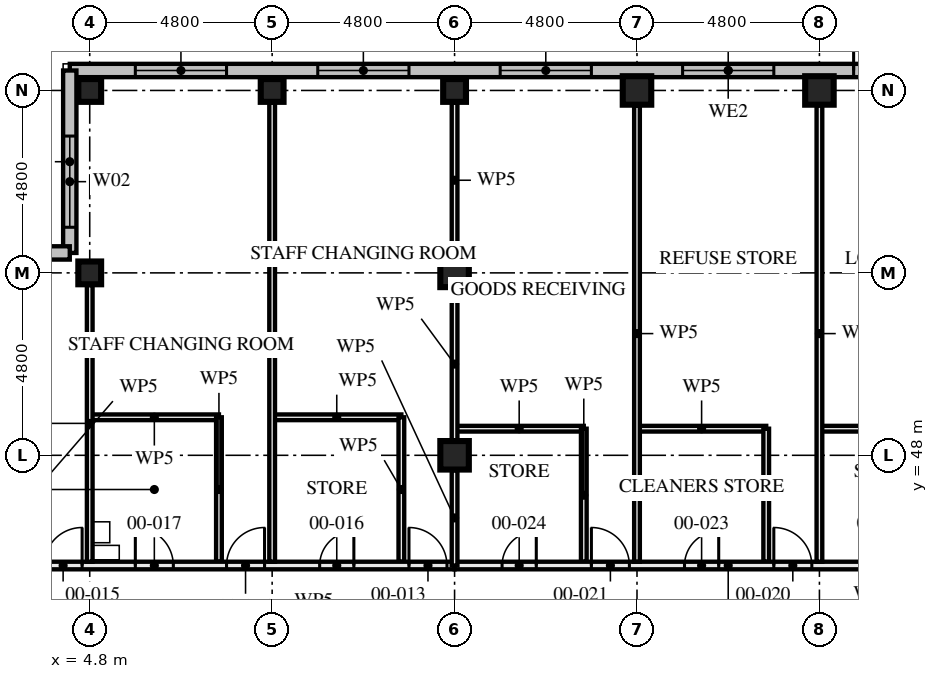
"""IFC4 building model, lengths in metres.
Left out: names, types, materials, properties, quantities, classifications, styles, units other than length and angle.
Written with IfcOpenShell. Run it as: python <this file> out.ifc"""

import sys

from ifc_helpers import new_model, si_unit, direction, frame, frame_2d, origin, origin_2d, place, context, subcontext, project, spatial, rectangle, hollow_rectangle, extrude, element, fill, save


model = new_model("IFC4")
c1 = context("Model", 3, precision=1e-05, world=origin(), true_north=direction((0.0, 1.0)))
c2 = subcontext(c1, "Body", "Model", "MODEL_VIEW")
j1 = project(units=[si_unit("LENGTHUNIT", "METRE"), si_unit("PLANEANGLEUNIT", "RADIAN")], contexts=[c1])
p1 = place(None, origin())
s1 = spatial("IfcSite", under=j1, at=p1, CompositionType="ELEMENT")
p2 = place(p1, origin())
s2 = spatial("IfcBuilding", under=s1, at=p2, CompositionType="ELEMENT")
p3 = place(p2, origin())
s3 = spatial("IfcBuildingStorey", under=s2, at=p3, CompositionType="ELEMENT", Elevation=0.0)
for number, where, z_axis, x_axis in (
    (1, (4.8, 52.8, 0.0), (0.0, 0.0, 1.0), (0.0, 1.0, 0.0)),
    (2, (4.8, 57.6, 0.0), (0.0, 0.0, 1.0), (0.0, 1.0, 0.0)),
    (3, (9.6, 57.6, 0.0), (0.0, 0.0, 1.0), (0.0, 1.0, 0.0)),
):
    element("IfcColumn", number, at=place(p3, frame(where, z_axis=z_axis, x_axis=x_axis)), inside=s3, PredefinedType="COLUMN", context=c2, shape_type="SweptSolid", body=[
        extrude(hollow_rectangle(XDim=0.6, YDim=0.6, WallThickness=0.08, at=origin_2d()), origin(), (0.0, 0.0, 1.0), 4.5),
    ])
for number, where, z_axis, x_axis in (
    (4, (14.4, 48.0, 0.0), (0.0, 0.0, 1.0), (1.0, 0.0, 0.0)),
    (5, (14.4, 52.8, 0.0), (0.0, 0.0, 1.0), (1.0, 0.0, 0.0)),
):
    element("IfcColumn", number, at=place(p3, frame(where, z_axis=z_axis, x_axis=x_axis)), inside=s3, PredefinedType="COLUMN", context=c2, shape_type="SweptSolid", body=[
        extrude(hollow_rectangle(XDim=0.75, YDim=0.75, WallThickness=0.08, at=origin_2d()), origin(), (0.0, 0.0, 1.0), 4.5),
    ])
p4 = place(p3, frame((14.4, 57.6, 0.0), z_axis=(0.0, 0.0, 1.0), x_axis=(0.0, 1.0, 0.0)))
e6 = element("IfcColumn", 6, at=p4, inside=s3, PredefinedType="COLUMN", context=c2, shape_type="SweptSolid", body=[
    extrude(hollow_rectangle(XDim=0.6, YDim=0.6, WallThickness=0.08, at=origin_2d()), origin(), (0.0, 0.0, 1.0), 4.5),
])
for number, where, z_axis, x_axis in (
    (7, (19.2, 57.6, 0.0), (0.0, 0.0, 1.0), (0.0, 1.0, 0.0)),
    (8, (24.0, 57.6, 0.0), (0.0, 0.0, 1.0), (0.0, 1.0, 0.0)),
):
    element("IfcColumn", number, at=place(p3, frame(where, z_axis=z_axis, x_axis=x_axis)), inside=s3, PredefinedType="COLUMN", context=c2, shape_type="SweptSolid", body=[
        extrude(hollow_rectangle(XDim=0.75, YDim=0.75, WallThickness=0.08, at=origin_2d()), origin(), (0.0, 0.0, 1.0), 4.5),
    ])
p5 = place(p3, frame((38.925, 58.125, 0.0), z_axis=(0.0, 0.0, 1.0), x_axis=(-1.0, 0.0, 0.0)))
e9 = element("IfcWall", 9, at=p5, inside=s3, PredefinedType="SOLIDWALL", context=c2, shape_type="SweptSolid", body=[
    extrude(rectangle(XDim=34.65, YDim=0.35, at=frame_2d((17.325, 0.0))), origin(), (0.0, 0.0, 1.0), 4.5),
])
p6 = place(p5, frame((11.025, 0.0, 0.0)))
e10 = element("IfcOpeningElement", 10, at=p6, cuts=e9, PredefinedType="OPENING", context=c2, shape_type="SweptSolid", body=[
    extrude(rectangle(XDim=3.0, YDim=3.6, at=frame_2d((1.5, 1.8))), frame((0.0, 0.186, 0.0), z_axis=(0.0, -1.0, 0.0), x_axis=(1.0, 0.0, 0.0)), (0.0, 0.0, 1.0), 0.371),
])
p7 = place(p5, frame((30.525, 0.0, 0.9)))
e11 = element("IfcOpeningElement", 11, at=p7, cuts=e9, PredefinedType="OPENING", context=c2, shape_type="SweptSolid", body=[
    extrude(rectangle(XDim=2.4, YDim=2.4, at=frame_2d((1.2, 1.2))), frame((0.0, 0.186, 0.0), z_axis=(0.0, -1.0, 0.0), x_axis=(1.0, 0.0, 0.0)), (0.0, 0.0, 1.0), 0.371),
])
p8 = place(p5, frame((25.725, 0.0, 0.9)))
e12 = element("IfcOpeningElement", 12, at=p8, cuts=e9, PredefinedType="OPENING", context=c2, shape_type="SweptSolid", body=[
    extrude(rectangle(XDim=2.4, YDim=2.4, at=frame_2d((1.2, 1.2))), frame((0.0, 0.186, 0.0), z_axis=(0.0, -1.0, 0.0), x_axis=(1.0, 0.0, 0.0)), (0.0, 0.0, 1.0), 0.371),
])
p9 = place(p5, frame((20.925, 0.0, 0.9)))
e13 = element("IfcOpeningElement", 13, at=p9, cuts=e9, PredefinedType="OPENING", context=c2, shape_type="SweptSolid", body=[
    extrude(rectangle(XDim=2.4, YDim=2.4, at=frame_2d((1.2, 1.2))), frame((0.0, 0.186, 0.0), z_axis=(0.0, -1.0, 0.0), x_axis=(1.0, 0.0, 0.0)), (0.0, 0.0, 1.0), 0.371),
])
p10 = place(p5, frame((16.125, 0.0, 0.9)))
e14 = element("IfcOpeningElement", 14, at=p10, cuts=e9, PredefinedType="OPENING", context=c2, shape_type="SweptSolid", body=[
    extrude(rectangle(XDim=2.4, YDim=2.4, at=frame_2d((1.2, 1.2))), frame((0.0, 0.186, 0.0), z_axis=(0.0, -1.0, 0.0), x_axis=(1.0, 0.0, 0.0)), (0.0, 0.0, 1.0), 0.371),
])
p11 = place(p5, frame((6.525, 0.0, 0.9)))
e15 = element("IfcOpeningElement", 15, at=p11, cuts=e9, PredefinedType="OPENING", context=c2, shape_type="SweptSolid", body=[
    extrude(rectangle(XDim=2.4, YDim=2.4, at=frame_2d((1.2, 1.2))), frame((0.0, 0.186, 0.0), z_axis=(0.0, -1.0, 0.0), x_axis=(1.0, 0.0, 0.0)), (0.0, 0.0, 1.0), 0.371),
])
p12 = place(p5, frame((1.725, 0.0, 0.9)))
e16 = element("IfcOpeningElement", 16, at=p12, cuts=e9, PredefinedType="OPENING", context=c2, shape_type="SweptSolid", body=[
    extrude(rectangle(XDim=2.4, YDim=2.4, at=frame_2d((1.2, 1.2))), frame((0.0, 0.186, 0.0), z_axis=(0.0, -1.0, 0.0), x_axis=(1.0, 0.0, 0.0)), (0.0, 0.0, 1.0), 0.371),
])
p13 = place(p3, frame((4.275, 58.125, 0.0), z_axis=(0.0, 0.0, 1.0), x_axis=(0.0, -1.0, 0.0)))
e17 = element("IfcWall", 17, at=p13, inside=s3, PredefinedType="SOLIDWALL", context=c2, shape_type="SweptSolid", body=[
    extrude(rectangle(XDim=4.8, YDim=0.35, at=frame_2d((2.4, 0.0))), origin(), (0.0, 0.0, 1.0), 4.5),
])
p14 = place(p13, frame((1.725, 0.0, 0.9)))
e18 = element("IfcOpeningElement", 18, at=p14, cuts=e17, PredefinedType="OPENING", context=c2, shape_type="SweptSolid", body=[
    extrude(rectangle(XDim=2.4, YDim=2.4, at=frame_2d((1.2, 1.2))), frame((0.0, 0.186, 0.0), z_axis=(0.0, -1.0, 0.0), x_axis=(1.0, 0.0, 0.0)), (0.0, 0.0, 1.0), 0.371),
])
p15 = place(p3, frame((4.275, 53.325, 0.0), z_axis=(0.0, 0.0, 1.0), x_axis=(-1.0, 0.0, 0.0)))
e19 = element("IfcWall", 19, at=p15, inside=s3, PredefinedType="SOLIDWALL", context=c2, shape_type="SweptSolid", body=[
    extrude(rectangle(XDim=4.8, YDim=0.35, at=frame_2d((2.4, 0.0))), origin(), (0.0, 0.0, 1.0), 4.5),
])
p16 = place(p15, frame((0.675, 0.0, 0.9)))
e20 = element("IfcOpeningElement", 20, at=p16, cuts=e19, PredefinedType="OPENING", context=c2, shape_type="SweptSolid", body=[
    extrude(rectangle(XDim=2.4, YDim=2.4, at=frame_2d((1.2, 1.2))), frame((0.0, 0.186, 0.0), z_axis=(0.0, -1.0, 0.0), x_axis=(1.0, 0.0, 0.0)), (0.0, 0.0, 1.0), 0.371),
])
p17 = place(p3, frame((13.0, 49.0, 0.0), z_axis=(0.0, 0.0, 1.0), x_axis=(0.0, -1.0, 0.0)))
e21 = element("IfcWall", 21, at=p17, inside=s3, PredefinedType="PARTITIONING", context=c2, shape_type="SweptSolid", body=[
    extrude(rectangle(XDim=3.8, YDim=0.15, at=frame_2d((1.9, 0.0))), origin(), (0.0, 0.0, 1.0), 3.55),
])
p18 = place(p3, frame((13.0, 49.0, 0.0), z_axis=(0.0, 0.0, 1.0), x_axis=(-1.0, 0.0, 0.0)))
e22 = element("IfcWall", 22, at=p18, inside=s3, PredefinedType="PARTITIONING", context=c2, shape_type="SweptSolid", body=[
    extrude(rectangle(XDim=3.4, YDim=0.15, at=frame_2d((1.7, 0.0))), origin(), (0.0, 0.0, 1.0), 4.33),
])
p19 = place(p3, frame((8.2, 49.0, 0.0), z_axis=(0.0, 0.0, 1.0), x_axis=(0.0, -1.0, 0.0)))
e23 = element("IfcWall", 23, at=p19, inside=s3, PredefinedType="PARTITIONING", context=c2, shape_type="SweptSolid", body=[
    extrude(rectangle(XDim=3.8, YDim=0.15, at=frame_2d((1.9, 0.0))), origin(), (0.0, 0.0, 1.0), 3.55),
])
p20 = place(p3, frame((8.2, 49.0, 0.0), z_axis=(0.0, 0.0, 1.0), x_axis=(-1.0, 0.0, 0.0)))
e24 = element("IfcWall", 24, at=p20, inside=s3, PredefinedType="PARTITIONING", context=c2, shape_type="SweptSolid", body=[
    extrude(rectangle(XDim=3.4, YDim=0.15, at=frame_2d((1.7, 0.0))), origin(), (0.0, 0.0, 1.0), 4.33),
])
p21 = place(p3, frame((9.6, 57.28, 0.0), z_axis=(0.0, 0.0, 1.0), x_axis=(0.0, -1.0, 0.0)))
e25 = element("IfcWall", 25, at=p21, inside=s3, PredefinedType="PARTITIONING", context=c2, shape_type="SweptSolid", body=[
    extrude(rectangle(XDim=12.08, YDim=0.15, at=frame_2d((6.04, 0.0))), origin(), (0.0, 0.0, 1.0), 3.55),
])
p22 = place(p3, frame((4.8, 52.48, 0.0), z_axis=(0.0, 0.0, 1.0), x_axis=(0.0, -1.0, 0.0)))
e26 = element("IfcWall", 26, at=p22, inside=s3, PredefinedType="PARTITIONING", context=c2, shape_type="SweptSolid", body=[
    extrude(rectangle(XDim=7.28, YDim=0.15, at=frame_2d((3.64, 0.0))), origin(), (0.0, 0.0, 1.0), 3.55),
])
p23 = place(p3, frame((14.4, 45.1, 0.0), z_axis=(0.0, 0.0, 1.0), x_axis=(-1.0, 0.0, 0.0)))
e27 = element("IfcWall", 27, at=p23, inside=s3, PredefinedType="PARTITIONING", context=c2, shape_type="SweptSolid", body=[
    extrude(rectangle(XDim=11.0, YDim=0.2, at=frame_2d((5.5, 0.0))), origin(), (0.0, 0.0, 1.0), 4.33),
])
p24 = place(p23, frame((0.2, 0.0, 0.0)))
e28 = element("IfcOpeningElement", 28, at=p24, cuts=e27, PredefinedType="OPENING", context=c2, shape_type="SweptSolid", body=[
    extrude(rectangle(XDim=1.0, YDim=2.4, at=frame_2d((0.5, 1.2))), frame((0.0, 0.111, 0.0), z_axis=(0.0, -1.0, 0.0), x_axis=(1.0, 0.0, 0.0)), (0.0, 0.0, 1.0), 0.221),
])
p25 = place(p23, frame((5.0, 0.0, 0.0)))
e29 = element("IfcOpeningElement", 29, at=p25, cuts=e27, PredefinedType="OPENING", context=c2, shape_type="SweptSolid", body=[
    extrude(rectangle(XDim=1.0, YDim=2.4, at=frame_2d((0.5, 1.2))), frame((0.0, 0.111, 0.0), z_axis=(0.0, -1.0, 0.0), x_axis=(1.0, 0.0, 0.0)), (0.0, 0.0, 1.0), 0.221),
])
p26 = place(p23, frame((9.8, 0.0, 0.0)))
e30 = element("IfcOpeningElement", 30, at=p26, cuts=e27, PredefinedType="OPENING", context=c2, shape_type="SweptSolid", body=[
    extrude(rectangle(XDim=1.0, YDim=2.4, at=frame_2d((0.5, 1.2))), frame((0.0, 0.111, 0.0), z_axis=(0.0, -1.0, 0.0), x_axis=(1.0, 0.0, 0.0)), (0.0, 0.0, 1.0), 0.221),
])
p27 = place(p23, frame((2.65, 0.0, 0.0)))
e31 = element("IfcOpeningElement", 31, at=p27, cuts=e27, PredefinedType="OPENING", context=c2, shape_type="SweptSolid", body=[
    extrude(rectangle(XDim=0.9, YDim=2.1, at=frame_2d((0.45, 1.05))), frame((0.0, 0.111, 0.0), z_axis=(0.0, -1.0, 0.0), x_axis=(1.0, 0.0, 0.0)), (0.0, 0.0, 1.0), 0.221),
])
p28 = place(p23, frame((7.4, 0.0, 0.0)))
e32 = element("IfcOpeningElement", 32, at=p28, cuts=e27, PredefinedType="OPENING", context=c2, shape_type="SweptSolid", body=[
    extrude(rectangle(XDim=1.0, YDim=2.1, at=frame_2d((0.5, 1.05))), frame((0.0, 0.111, 0.0), z_axis=(0.0, -1.0, 0.0), x_axis=(1.0, 0.0, 0.0)), (0.0, 0.0, 1.0), 0.221),
])
p29 = place(p3, frame((27.4, 48.7, 0.0), z_axis=(0.0, 0.0, 1.0), x_axis=(-1.0, 0.0, 0.0)))
e33 = element("IfcWall", 33, at=p29, inside=s3, PredefinedType="PARTITIONING", context=c2, shape_type="SweptSolid", body=[
    extrude(rectangle(XDim=3.4, YDim=0.15, at=frame_2d((1.7, 0.0))), origin(), (0.0, 0.0, 1.0), 4.33),
])
p30 = place(p3, frame((22.6, 48.7, 0.0), z_axis=(0.0, 0.0, 1.0), x_axis=(0.0, -1.0, 0.0)))
e34 = element("IfcWall", 34, at=p30, inside=s3, PredefinedType="PARTITIONING", context=c2, shape_type="SweptSolid", body=[
    extrude(rectangle(XDim=3.5, YDim=0.15, at=frame_2d((1.75, 0.0))), origin(), (0.0, 0.0, 1.0), 3.55),
])
p31 = place(p3, frame((22.6, 48.7, 0.0), z_axis=(0.0, 0.0, 1.0), x_axis=(-1.0, 0.0, 0.0)))
e35 = element("IfcWall", 35, at=p31, inside=s3, PredefinedType="PARTITIONING", context=c2, shape_type="SweptSolid", body=[
    extrude(rectangle(XDim=3.4, YDim=0.15, at=frame_2d((1.7, 0.0))), origin(), (0.0, 0.0, 1.0), 4.33),
])
p32 = place(p3, frame((17.8, 48.7, 0.0), z_axis=(0.0, 0.0, 1.0), x_axis=(0.0, -1.0, 0.0)))
e36 = element("IfcWall", 36, at=p32, inside=s3, PredefinedType="PARTITIONING", context=c2, shape_type="SweptSolid", body=[
    extrude(rectangle(XDim=3.5, YDim=0.15, at=frame_2d((1.75, 0.0))), origin(), (0.0, 0.0, 1.0), 3.55),
])
p33 = place(p3, frame((17.8, 48.7, 0.0), z_axis=(0.0, 0.0, 1.0), x_axis=(-1.0, 0.0, 0.0)))
e37 = element("IfcWall", 37, at=p33, inside=s3, PredefinedType="PARTITIONING", context=c2, shape_type="SweptSolid", body=[
    extrude(rectangle(XDim=3.4, YDim=0.15, at=frame_2d((1.7, 0.0))), origin(), (0.0, 0.0, 1.0), 4.33),
])
for number, where, z_axis, x_axis in (
    (38, (24.0, 57.205, 0.0), (0.0, 0.0, 1.0), (0.0, -1.0, 0.0)),
    (39, (19.2, 57.205, 0.0), (0.0, 0.0, 1.0), (0.0, -1.0, 0.0)),
):
    element("IfcWall", number, at=place(p3, frame(where, z_axis=z_axis, x_axis=x_axis)), inside=s3, PredefinedType="PARTITIONING", context=c2, shape_type="SweptSolid", body=[
        extrude(rectangle(XDim=12.005, YDim=0.15, at=frame_2d((6.002, 0.0))), origin(), (0.0, 0.0, 1.0), 3.55),
    ])
p34 = place(p3, frame((28.8, 45.1, 0.0), z_axis=(0.0, 0.0, 1.0), x_axis=(-1.0, 0.0, 0.0)))
e40 = element("IfcWall", 40, at=p34, inside=s3, PredefinedType="PARTITIONING", context=c2, shape_type="SweptSolid", body=[
    extrude(rectangle(XDim=14.4, YDim=0.2, at=frame_2d((7.2, 0.0))), origin(), (0.0, 0.0, 1.0), 4.33),
])
p35 = place(p34, frame((0.2, 0.0, 0.0)))
e41 = element("IfcOpeningElement", 41, at=p35, cuts=e40, PredefinedType="OPENING", context=c2, shape_type="SweptSolid", body=[
    extrude(rectangle(XDim=1.0, YDim=2.4, at=frame_2d((0.5, 1.2))), frame((0.0, 0.111, 0.0), z_axis=(0.0, -1.0, 0.0), x_axis=(1.0, 0.0, 0.0)), (0.0, 0.0, 1.0), 0.221),
])
p36 = place(p34, frame((5.0, 0.0, 0.0)))
e42 = element("IfcOpeningElement", 42, at=p36, cuts=e40, PredefinedType="OPENING", context=c2, shape_type="SweptSolid", body=[
    extrude(rectangle(XDim=1.0, YDim=2.4, at=frame_2d((0.5, 1.2))), frame((0.0, 0.111, 0.0), z_axis=(0.0, -1.0, 0.0), x_axis=(1.0, 0.0, 0.0)), (0.0, 0.0, 1.0), 0.221),
])
p37 = place(p34, frame((9.8, 0.0, 0.0)))
e43 = element("IfcOpeningElement", 43, at=p37, cuts=e40, PredefinedType="OPENING", context=c2, shape_type="SweptSolid", body=[
    extrude(rectangle(XDim=1.0, YDim=2.4, at=frame_2d((0.5, 1.2))), frame((0.0, 0.111, 0.0), z_axis=(0.0, -1.0, 0.0), x_axis=(1.0, 0.0, 0.0)), (0.0, 0.0, 1.0), 0.221),
])
p38 = place(p34, frame((2.65, 0.0, 0.0)))
e44 = element("IfcOpeningElement", 44, at=p38, cuts=e40, PredefinedType="OPENING", context=c2, shape_type="SweptSolid", body=[
    extrude(rectangle(XDim=0.9, YDim=2.1, at=frame_2d((0.45, 1.05))), frame((0.0, 0.111, 0.0), z_axis=(0.0, -1.0, 0.0), x_axis=(1.0, 0.0, 0.0)), (0.0, 0.0, 1.0), 0.221),
])
p39 = place(p34, frame((7.45, 0.0, 0.0)))
e45 = element("IfcOpeningElement", 45, at=p39, cuts=e40, PredefinedType="OPENING", context=c2, shape_type="SweptSolid", body=[
    extrude(rectangle(XDim=0.9, YDim=2.1, at=frame_2d((0.45, 1.05))), frame((0.0, 0.111, 0.0), z_axis=(0.0, -1.0, 0.0), x_axis=(1.0, 0.0, 0.0)), (0.0, 0.0, 1.0), 0.221),
])
p40 = place(p34, frame((12.25, 0.0, 0.0)))
e46 = element("IfcOpeningElement", 46, at=p40, cuts=e40, PredefinedType="OPENING", context=c2, shape_type="SweptSolid", body=[
    extrude(rectangle(XDim=0.9, YDim=2.1, at=frame_2d((0.45, 1.05))), frame((0.0, 0.111, 0.0), z_axis=(0.0, -1.0, 0.0), x_axis=(1.0, 0.0, 0.0)), (0.0, 0.0, 1.0), 0.221),
])
p41 = place(p3, frame((14.4, 45.1, 0.0), z_axis=(0.0, 0.0, 1.0), x_axis=(0.0, 1.0, 0.0)))
e47 = element("IfcWall", 47, at=p41, inside=s3, PredefinedType="PARTITIONING", context=c2, shape_type="SweptSolid", body=[
    extrude(rectangle(XDim=2.505, YDim=0.15, at=frame_2d((1.252, 0.0))), origin(), (0.0, 0.0, 1.0), 3.32),
])
p42 = place(p3, frame((14.4, 48.395, 0.0), z_axis=(0.0, 0.0, 1.0), x_axis=(0.0, 1.0, 0.0)))
e48 = element("IfcWall", 48, at=p42, inside=s3, PredefinedType="PARTITIONING", context=c2, shape_type="SweptSolid", body=[
    extrude(rectangle(XDim=4.01, YDim=0.15, at=frame_2d((2.005, 0.0))), origin(), (0.0, 0.0, 1.0), 3.32),
])
p43 = place(p3, frame((14.4, 53.195, 0.0), z_axis=(0.0, 0.0, 1.0), x_axis=(0.0, 1.0, 0.0)))
e49 = element("IfcWall", 49, at=p43, inside=s3, PredefinedType="PARTITIONING", context=c2, shape_type="SweptSolid", body=[
    extrude(rectangle(XDim=4.085, YDim=0.15, at=frame_2d((2.042, 0.0))), origin(), (0.0, 0.0, 1.0), 3.32),
])
p44 = place(p6, frame((3.0, 0.0, 0.0), z_axis=(0.0, 0.0, 1.0), x_axis=(-1.0, 0.0, 0.0)))
e50 = element("IfcDoor", 50, at=p44, inside=s3, OperationType="DOUBLE_DOOR_SINGLE_SWING", PredefinedType="DOOR", context=c2, shape_type="SweptSolid", body=[
    extrude(rectangle(XDim=3.0, YDim=3.6, at=frame_2d((1.5, 1.8))), frame((0.0, 0.035, 0.0), z_axis=(0.0, -1.0, 0.0), x_axis=(1.0, 0.0, 0.0)), (0.0, 0.0, 1.0), 0.07),
])
fill(e10, e50)
p45 = place(p7, origin())
e51 = element("IfcWindow", 51, at=p45, inside=s3, PartitioningType="SINGLE_PANEL", PredefinedType="WINDOW", context=c2, shape_type="SweptSolid", body=[
    extrude(rectangle(XDim=2.4, YDim=2.4, at=frame_2d((1.2, 1.2))), frame((0.0, 0.03, 0.0), z_axis=(0.0, -1.0, 0.0), x_axis=(1.0, 0.0, 0.0)), (0.0, 0.0, 1.0), 0.06),
])
fill(e11, e51)
p46 = place(p8, origin())
e52 = element("IfcWindow", 52, at=p46, inside=s3, PartitioningType="SINGLE_PANEL", PredefinedType="WINDOW", context=c2, shape_type="SweptSolid", body=[
    extrude(rectangle(XDim=2.4, YDim=2.4, at=frame_2d((1.2, 1.2))), frame((0.0, 0.03, 0.0), z_axis=(0.0, -1.0, 0.0), x_axis=(1.0, 0.0, 0.0)), (0.0, 0.0, 1.0), 0.06),
])
fill(e12, e52)
p47 = place(p9, origin())
e53 = element("IfcWindow", 53, at=p47, inside=s3, PartitioningType="SINGLE_PANEL", PredefinedType="WINDOW", context=c2, shape_type="SweptSolid", body=[
    extrude(rectangle(XDim=2.4, YDim=2.4, at=frame_2d((1.2, 1.2))), frame((0.0, 0.03, 0.0), z_axis=(0.0, -1.0, 0.0), x_axis=(1.0, 0.0, 0.0)), (0.0, 0.0, 1.0), 0.06),
])
fill(e13, e53)
p48 = place(p10, origin())
e54 = element("IfcWindow", 54, at=p48, inside=s3, PartitioningType="SINGLE_PANEL", PredefinedType="WINDOW", context=c2, shape_type="SweptSolid", body=[
    extrude(rectangle(XDim=2.4, YDim=2.4, at=frame_2d((1.2, 1.2))), frame((0.0, 0.03, 0.0), z_axis=(0.0, -1.0, 0.0), x_axis=(1.0, 0.0, 0.0)), (0.0, 0.0, 1.0), 0.06),
])
fill(e14, e54)
p49 = place(p14, origin())
e55 = element("IfcWindow", 55, at=p49, inside=s3, PartitioningType="SINGLE_PANEL", PredefinedType="WINDOW", context=c2, shape_type="SweptSolid", body=[
    extrude(rectangle(XDim=2.4, YDim=2.4, at=frame_2d((1.2, 1.2))), frame((0.0, 0.03, 0.0), z_axis=(0.0, -1.0, 0.0), x_axis=(1.0, 0.0, 0.0)), (0.0, 0.0, 1.0), 0.06),
])
fill(e18, e55)
p50 = place(p24, frame((1.0, 0.0, 0.0), z_axis=(0.0, 0.0, 1.0), x_axis=(-1.0, 0.0, 0.0)))
e56 = element("IfcDoor", 56, at=p50, inside=s3, OperationType="SINGLE_SWING_RIGHT", PredefinedType="DOOR", context=c2, shape_type="SweptSolid", body=[
    extrude(rectangle(XDim=1.0, YDim=2.4, at=frame_2d((0.5, 1.2))), frame((0.0, 0.027, 0.0), z_axis=(0.0, -1.0, 0.0), x_axis=(1.0, 0.0, 0.0)), (0.0, 0.0, 1.0), 0.054),
])
fill(e28, e56)
p51 = place(p25, frame((1.0, 0.0, 0.0), z_axis=(0.0, 0.0, 1.0), x_axis=(-1.0, 0.0, 0.0)))
e57 = element("IfcDoor", 57, at=p51, inside=s3, OperationType="SINGLE_SWING_LEFT", PredefinedType="DOOR", context=c2, shape_type="SweptSolid", body=[
    extrude(rectangle(XDim=1.0, YDim=2.4, at=frame_2d((0.5, 1.2))), frame((0.0, 0.027, 0.0), z_axis=(0.0, -1.0, 0.0), x_axis=(1.0, 0.0, 0.0)), (0.0, 0.0, 1.0), 0.054),
])
fill(e29, e57)
p52 = place(p26, frame((1.0, 0.0, 0.0), z_axis=(0.0, 0.0, 1.0), x_axis=(-1.0, 0.0, 0.0)))
e58 = element("IfcDoor", 58, at=p52, inside=s3, OperationType="SINGLE_SWING_LEFT", PredefinedType="DOOR", context=c2, shape_type="SweptSolid", body=[
    extrude(rectangle(XDim=1.0, YDim=2.4, at=frame_2d((0.5, 1.2))), frame((0.0, 0.027, 0.0), z_axis=(0.0, -1.0, 0.0), x_axis=(1.0, 0.0, 0.0)), (0.0, 0.0, 1.0), 0.054),
])
fill(e30, e58)
p53 = place(p27, frame((0.9, 0.0, 0.0), z_axis=(0.0, 0.0, 1.0), x_axis=(-1.0, 0.0, 0.0)))
e59 = element("IfcDoor", 59, at=p53, inside=s3, OperationType="SINGLE_SWING_LEFT", PredefinedType="DOOR", context=c2, shape_type="SweptSolid", body=[
    extrude(rectangle(XDim=0.9, YDim=2.1, at=frame_2d((0.45, 1.05))), frame((0.0, 0.027, 0.0), z_axis=(0.0, -1.0, 0.0), x_axis=(1.0, 0.0, 0.0)), (0.0, 0.0, 1.0), 0.054),
])
fill(e31, e59)
p54 = place(p28, frame((1.0, 0.0, 0.0), z_axis=(0.0, 0.0, 1.0), x_axis=(-1.0, 0.0, 0.0)))
e60 = element("IfcDoor", 60, at=p54, inside=s3, OperationType="SINGLE_SWING_RIGHT", PredefinedType="DOOR", context=c2, shape_type="SweptSolid", body=[
    extrude(rectangle(XDim=1.0, YDim=2.1, at=frame_2d((0.5, 1.05))), frame((0.0, 0.027, 0.0), z_axis=(0.0, -1.0, 0.0), x_axis=(1.0, 0.0, 0.0)), (0.0, 0.0, 1.0), 0.054),
])
fill(e32, e60)
p55 = place(p36, frame((1.0, 0.0, 0.0), z_axis=(0.0, 0.0, 1.0), x_axis=(-1.0, 0.0, 0.0)))
e61 = element("IfcDoor", 61, at=p55, inside=s3, OperationType="SINGLE_SWING_RIGHT", PredefinedType="DOOR", context=c2, shape_type="SweptSolid", body=[
    extrude(rectangle(XDim=1.0, YDim=2.4, at=frame_2d((0.5, 1.2))), frame((0.0, 0.027, 0.0), z_axis=(0.0, -1.0, 0.0), x_axis=(1.0, 0.0, 0.0)), (0.0, 0.0, 1.0), 0.054),
])
fill(e42, e61)
p56 = place(p37, frame((1.0, 0.0, 0.0), z_axis=(0.0, 0.0, 1.0), x_axis=(-1.0, 0.0, 0.0)))
e62 = element("IfcDoor", 62, at=p56, inside=s3, OperationType="SINGLE_SWING_RIGHT", PredefinedType="DOOR", context=c2, shape_type="SweptSolid", body=[
    extrude(rectangle(XDim=1.0, YDim=2.4, at=frame_2d((0.5, 1.2))), frame((0.0, 0.027, 0.0), z_axis=(0.0, -1.0, 0.0), x_axis=(1.0, 0.0, 0.0)), (0.0, 0.0, 1.0), 0.054),
])
fill(e43, e62)
p57 = place(p39, frame((0.9, 0.0, 0.0), z_axis=(0.0, 0.0, 1.0), x_axis=(-1.0, 0.0, 0.0)))
e63 = element("IfcDoor", 63, at=p57, inside=s3, OperationType="SINGLE_SWING_LEFT", PredefinedType="DOOR", context=c2, shape_type="SweptSolid", body=[
    extrude(rectangle(XDim=0.9, YDim=2.1, at=frame_2d((0.45, 1.05))), frame((0.0, 0.027, 0.0), z_axis=(0.0, -1.0, 0.0), x_axis=(1.0, 0.0, 0.0)), (0.0, 0.0, 1.0), 0.054),
])
fill(e45, e63)
p58 = place(p40, frame((0.9, 0.0, 0.0), z_axis=(0.0, 0.0, 1.0), x_axis=(-1.0, 0.0, 0.0)))
e64 = element("IfcDoor", 64, at=p58, inside=s3, OperationType="SINGLE_SWING_LEFT", PredefinedType="DOOR", context=c2, shape_type="SweptSolid", body=[
    extrude(rectangle(XDim=0.9, YDim=2.1, at=frame_2d((0.45, 1.05))), frame((0.0, 0.027, 0.0), z_axis=(0.0, -1.0, 0.0), x_axis=(1.0, 0.0, 0.0)), (0.0, 0.0, 1.0), 0.054),
])
fill(e46, e64)
save(model, sys.argv[1])
